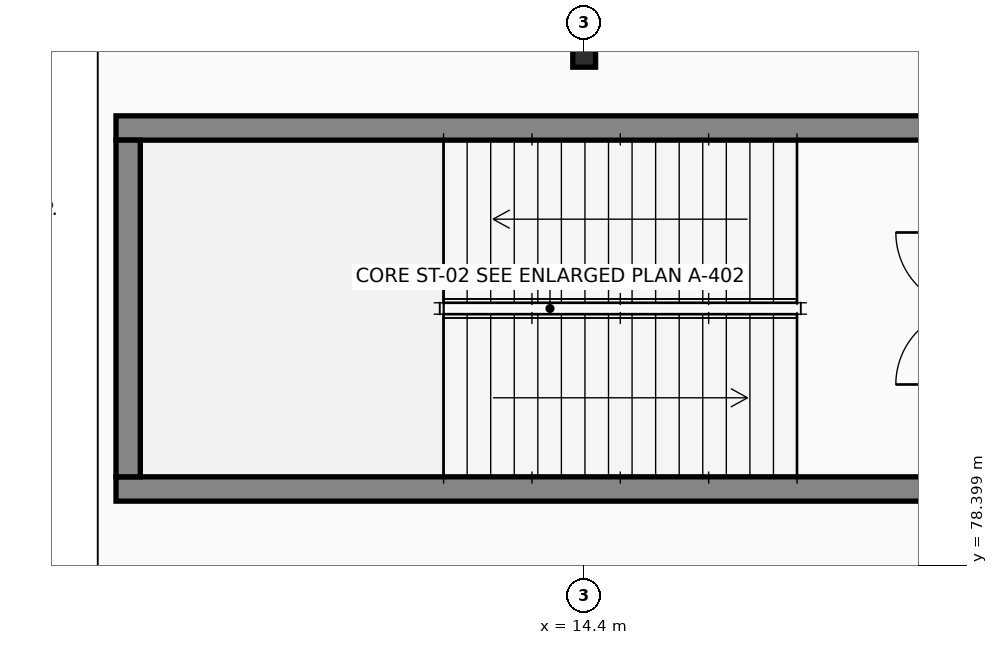
"""IFC4 building model, lengths in metres.
Left out: names, types, materials, properties, quantities, classifications, styles, units other than length and angle.
Written with IfcOpenShell. Run it as: python <this file> out.ifc"""

import sys

from ifc_helpers import new_model, si_unit, direction, frame, frame_2d, origin, origin_2d, place, context, subcontext, project, spatial, rectangle, i_section, extrude, element, save


model = new_model("IFC4")
c1 = context("Model", 3, precision=1e-05, world=origin(), true_north=direction((0.0, 1.0)))
c2 = subcontext(c1, "Body", "Model", "MODEL_VIEW")
j1 = project(units=[si_unit("LENGTHUNIT", "METRE"), si_unit("PLANEANGLEUNIT", "RADIAN")], contexts=[c1])
p1 = place(None, origin())
s1 = spatial("IfcSite", under=j1, at=p1, CompositionType="ELEMENT")
p2 = place(p1, origin())
s2 = spatial("IfcBuilding", under=s1, at=p2, CompositionType="ELEMENT")
p3 = place(p2, frame((0.0, 0.0, -4.8)))
s3 = spatial("IfcBuildingStorey", under=s2, at=p3, CompositionType="ELEMENT", Elevation=-4.8)
p4 = place(p3, frame((14.4, 85.2, 0.0), z_axis=(0.0, 0.0, 1.0), x_axis=(1.0, 0.0, 0.0)))
e1 = element("IfcColumn", 1, at=p4, inside=s3, PredefinedType="COLUMN", context=c2, shape_type="SweptSolid", body=[
    extrude(i_section(OverallWidth=0.3, OverallDepth=0.5, WebThickness=0.014, FlangeThickness=0.028, at=origin_2d()), origin(), (0.0, 0.0, 1.0), 4.8),
])
for number, where, z_axis, x_axis in (
    (2, (8.24, 79.4, 0.0), (0.0, 0.0, 1.0), (1.0, 0.0, 0.0)),
    (3, (8.24, 84.15, 0.0), (0.0, 0.0, 1.0), (1.0, 0.0, 0.0)),
):
    element("IfcWall", number, at=place(p3, frame(where, z_axis=z_axis, x_axis=x_axis)), inside=s3, PredefinedType="SHEAR", context=c2, shape_type="SweptSolid", body=[
        extrude(rectangle(XDim=11.42, YDim=0.32, at=frame_2d((5.71, 0.0))), origin(), (0.0, 0.0, 1.0), 4.55),
    ])
p5 = place(p3, frame((8.4, 79.56, 0.0), z_axis=(0.0, 0.0, 1.0), x_axis=(0.0, 1.0, 0.0)))
e4 = element("IfcWall", 4, at=p5, inside=s3, PredefinedType="SHEAR", context=c2, shape_type="SweptSolid", body=[
    extrude(rectangle(XDim=4.43, YDim=0.32, at=frame_2d((2.215, 0.0))), origin(), (0.0, 0.0, 1.0), 4.55),
])
save(model, sys.argv[1])
